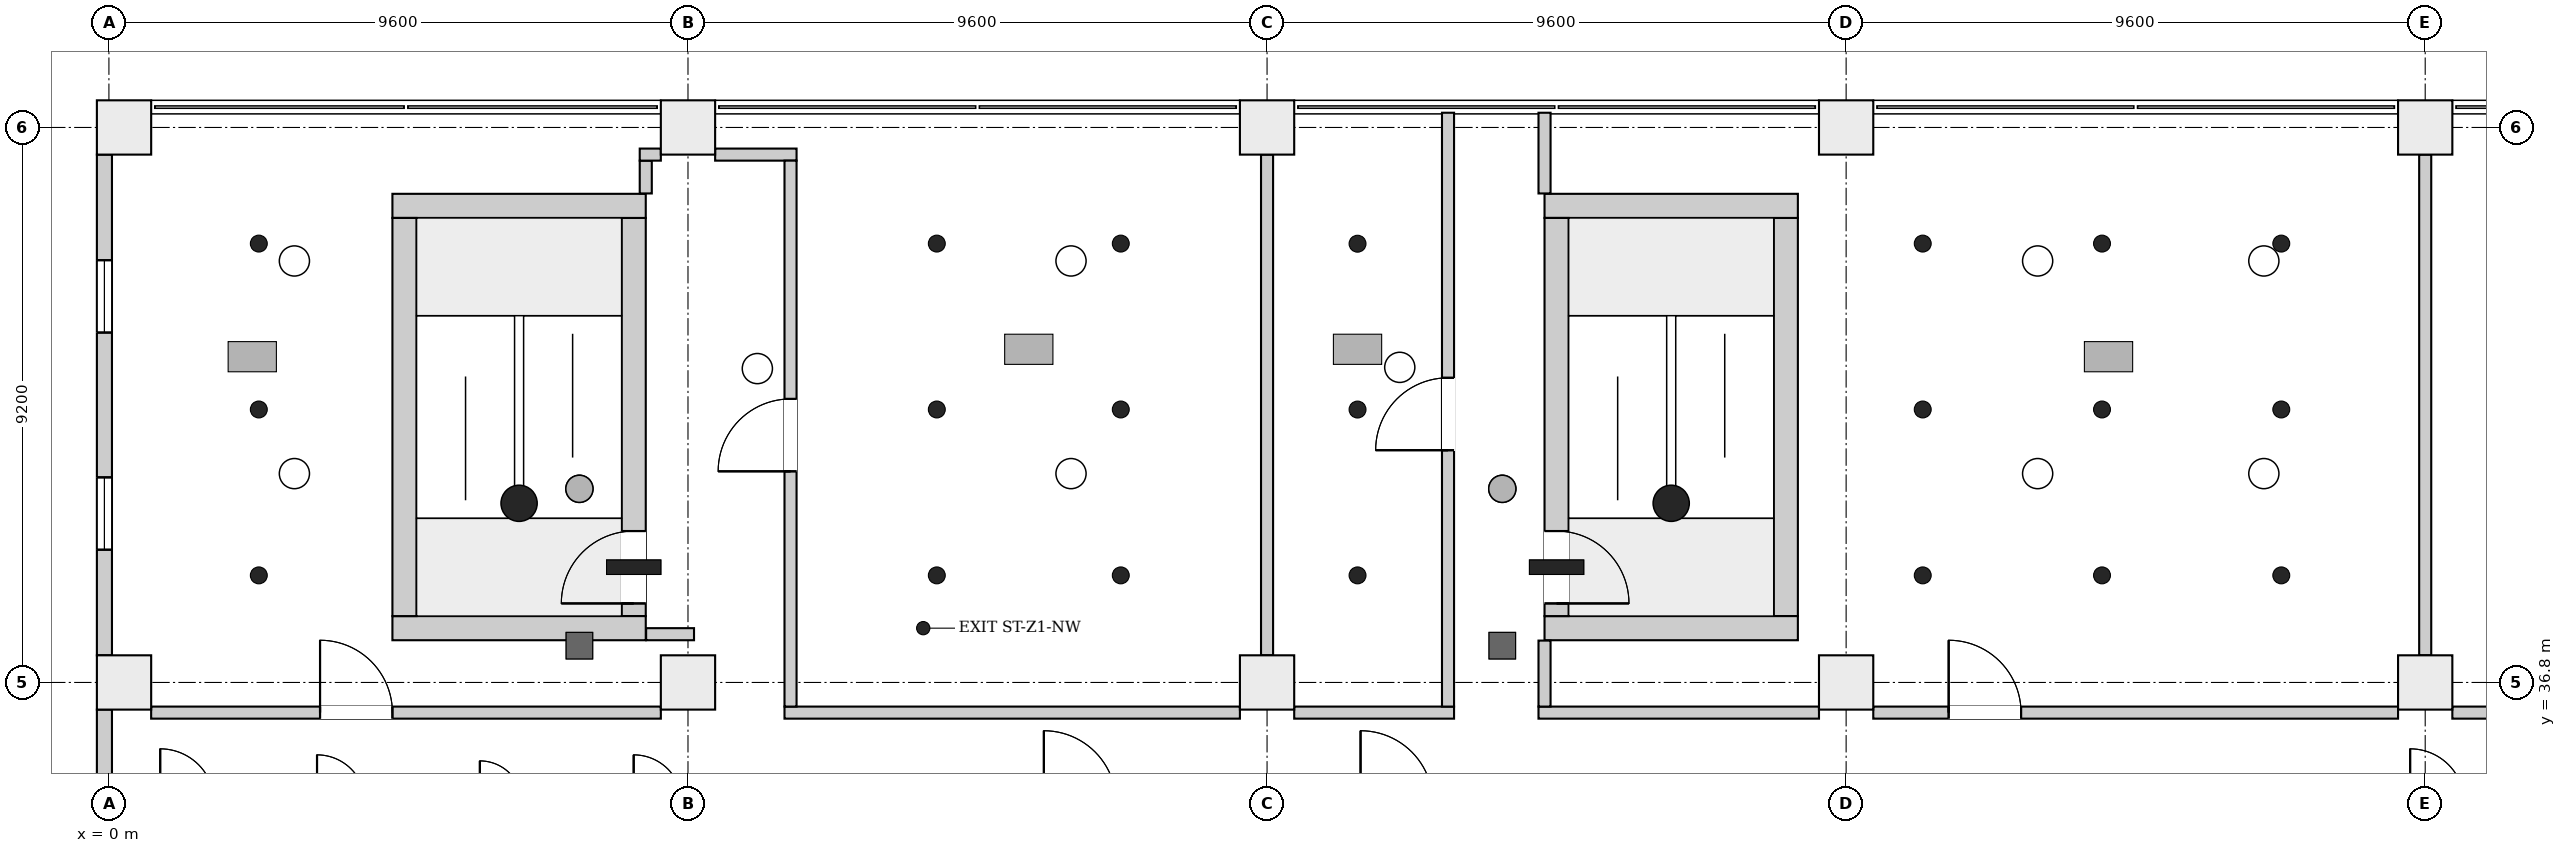
"""IFC4 building model, lengths in metres.
Left out: names, types, materials, properties, quantities, classifications, styles, units other than length and angle.
Written with IfcOpenShell. Run it as: python <this file> out.ifc"""

import sys

from ifc_helpers import new_model, si_unit, direction, frame, frame_2d, origin, origin_2d, place, context, subcontext, project, spatial, rectangle, extrude, element, fill, save


model = new_model("IFC4")
c1 = context("Model", 3, precision=1e-05, world=origin(), true_north=direction((0.0, 1.0)))
c2 = subcontext(c1, "Body", "Model", "MODEL_VIEW")
j1 = project(units=[si_unit("LENGTHUNIT", "METRE"), si_unit("PLANEANGLEUNIT", "RADIAN")], contexts=[c1])
p1 = place(None, origin())
s1 = spatial("IfcSite", under=j1, at=p1, CompositionType="ELEMENT")
p2 = place(p1, origin())
s2 = spatial("IfcBuilding", under=s1, at=p2, CompositionType="ELEMENT")
p3 = place(p2, frame((0.0, 0.0, 36.1)))
s3 = spatial("IfcBuildingStorey", under=s2, at=p3, CompositionType="ELEMENT", Elevation=36.1)
for number, where, z_axis, x_axis in (
    (1, (4.7, 37.7, 0.0), (0.0, 0.0, 1.0), (1.0, 0.0, 0.0)),
    (2, (4.7, 44.7, 0.0), (0.0, 0.0, 1.0), (1.0, 0.0, 0.0)),
):
    element("IfcWall", number, at=place(p3, frame(where, z_axis=z_axis, x_axis=x_axis)), inside=s3, PredefinedType="SHEAR", context=c2, shape_type="SweptSolid", body=[
        extrude(rectangle(XDim=4.2, YDim=0.4, at=frame_2d((2.1, 0.0))), origin(), (0.0, 0.0, 1.0), 4.2),
    ])
p4 = place(p3, frame((4.9, 37.9, 0.0), z_axis=(0.0, 0.0, 1.0), x_axis=(0.0, 1.0, 0.0)))
e3 = element("IfcWall", 3, at=p4, inside=s3, PredefinedType="SHEAR", context=c2, shape_type="SweptSolid", body=[
    extrude(rectangle(XDim=6.6, YDim=0.4, at=frame_2d((3.3, 0.0))), origin(), (0.0, 0.0, 1.0), 4.2),
])
p5 = place(p3, frame((8.7, 37.9, 0.0), z_axis=(0.0, 0.0, 1.0), x_axis=(0.0, 1.0, 0.0)))
e4 = element("IfcWall", 4, at=p5, inside=s3, PredefinedType="SHEAR", context=c2, shape_type="SweptSolid", body=[
    extrude(rectangle(XDim=6.6, YDim=0.4, at=frame_2d((3.3, 0.0))), origin(), (0.0, 0.0, 1.0), 4.2),
])
p6 = place(p5, frame((0.21, 0.0, 0.0)))
e5 = element("IfcOpeningElement", 5, at=p6, cuts=e4, PredefinedType="OPENING", context=c2, shape_type="SweptSolid", body=[
    extrude(rectangle(XDim=1.2, YDim=2.1, at=frame_2d((0.6, 1.05))), frame((0.0, 0.21, 0.0), z_axis=(0.0, -1.0, 0.0), x_axis=(1.0, 0.0, 0.0)), (0.0, 0.0, 1.0), 0.42),
])
for number, where, z_axis, x_axis in (
    (6, (23.8, 37.7, 0.0), (0.0, 0.0, 1.0), (1.0, 0.0, 0.0)),
    (7, (23.8, 44.7, 0.0), (0.0, 0.0, 1.0), (1.0, 0.0, 0.0)),
):
    element("IfcWall", number, at=place(p3, frame(where, z_axis=z_axis, x_axis=x_axis)), inside=s3, PredefinedType="SHEAR", context=c2, shape_type="SweptSolid", body=[
        extrude(rectangle(XDim=4.2, YDim=0.4, at=frame_2d((2.1, 0.0))), origin(), (0.0, 0.0, 1.0), 4.2),
    ])
p7 = place(p3, frame((24.0, 37.9, 0.0), z_axis=(0.0, 0.0, 1.0), x_axis=(0.0, 1.0, 0.0)))
e8 = element("IfcWall", 8, at=p7, inside=s3, PredefinedType="SHEAR", context=c2, shape_type="SweptSolid", body=[
    extrude(rectangle(XDim=6.6, YDim=0.4, at=frame_2d((3.3, 0.0))), origin(), (0.0, 0.0, 1.0), 4.2),
])
p8 = place(p7, frame((0.21, 0.0, 0.0)))
e9 = element("IfcOpeningElement", 9, at=p8, cuts=e8, PredefinedType="OPENING", context=c2, shape_type="SweptSolid", body=[
    extrude(rectangle(XDim=1.2, YDim=2.1, at=frame_2d((0.6, 1.05))), frame((0.0, 0.21, 0.0), z_axis=(0.0, -1.0, 0.0), x_axis=(1.0, 0.0, 0.0)), (0.0, 0.0, 1.0), 0.42),
])
p9 = place(p3, frame((27.8, 37.9, 0.0), z_axis=(0.0, 0.0, 1.0), x_axis=(0.0, 1.0, 0.0)))
e10 = element("IfcWall", 10, at=p9, inside=s3, PredefinedType="SHEAR", context=c2, shape_type="SweptSolid", body=[
    extrude(rectangle(XDim=6.6, YDim=0.4, at=frame_2d((3.3, 0.0))), origin(), (0.0, 0.0, 1.0), 4.2),
])
for number, where, z_axis, x_axis in (
    (11, (0.25, 36.8, 0.0), (0.0, 0.0, 1.0), (1.0, 0.0, 0.0)),
    (12, (9.6, 36.8, 0.0), (0.0, 0.0, 1.0), (1.0, 0.0, 0.0)),
    (13, (19.2, 36.8, 0.0), (0.0, 0.0, 1.0), (1.0, 0.0, 0.0)),
    (14, (28.8, 36.8, 0.0), (0.0, 0.0, 1.0), (1.0, 0.0, 0.0)),
    (15, (38.4, 36.8, 0.0), (0.0, 0.0, 1.0), (1.0, 0.0, 0.0)),
    (16, (0.25, 46.0, 0.0), (0.0, 0.0, 1.0), (1.0, 0.0, 0.0)),
    (17, (9.6, 46.0, 0.0), (0.0, 0.0, 1.0), (1.0, 0.0, 0.0)),
    (18, (19.2, 46.0, 0.0), (0.0, 0.0, 1.0), (1.0, 0.0, 0.0)),
    (19, (28.8, 46.0, 0.0), (0.0, 0.0, 1.0), (1.0, 0.0, 0.0)),
    (20, (38.4, 46.0, 0.0), (0.0, 0.0, 1.0), (1.0, 0.0, 0.0)),
):
    element("IfcColumn", number, at=place(p3, frame(where, z_axis=z_axis, x_axis=x_axis)), inside=s3, PredefinedType="COLUMN", context=c2, shape_type="SweptSolid", body=[
        extrude(rectangle(XDim=0.9, YDim=0.9, at=origin_2d()), origin(), (0.0, 0.0, 1.0), 4.2),
    ])
p10 = place(p3, frame((-0.074, 36.35, 0.0), z_axis=(0.0, 0.0, 1.0), x_axis=(0.0, -1.0, 0.0)))
e21 = element("IfcWall", 21, at=p10, inside=s3, PredefinedType="ELEMENTEDWALL", context=c2, shape_type="SweptSolid", body=[
    extrude(rectangle(XDim=8.3, YDim=0.25, at=frame_2d((4.15, 0.0))), origin(), (0.0, 0.0, 1.0), 3.9),
])
p11 = place(p10, frame((5.35, 0.0, 0.9)))
e22 = element("IfcOpeningElement", 22, at=p11, cuts=e21, PredefinedType="OPENING", context=c2, shape_type="SweptSolid", body=[
    extrude(rectangle(XDim=1.2, YDim=2.6, at=frame_2d((0.6, 1.3))), frame((0.0, 0.135, 0.0), z_axis=(0.0, -1.0, 0.0), x_axis=(1.0, 0.0, 0.0)), (0.0, 0.0, 1.0), 0.27),
])
p12 = place(p10, frame((1.75, 0.0, 0.9)))
e23 = element("IfcOpeningElement", 23, at=p12, cuts=e21, PredefinedType="OPENING", context=c2, shape_type="SweptSolid", body=[
    extrude(rectangle(XDim=1.2, YDim=2.6, at=frame_2d((0.6, 1.3))), frame((0.0, 0.135, 0.0), z_axis=(0.0, -1.0, 0.0), x_axis=(1.0, 0.0, 0.0)), (0.0, 0.0, 1.0), 0.27),
])
p13 = place(p3, frame((-0.074, 45.55, 0.0), z_axis=(0.0, 0.0, 1.0), x_axis=(0.0, -1.0, 0.0)))
e24 = element("IfcWall", 24, at=p13, inside=s3, PredefinedType="ELEMENTEDWALL", context=c2, shape_type="SweptSolid", body=[
    extrude(rectangle(XDim=8.3, YDim=0.25, at=frame_2d((4.15, 0.0))), origin(), (0.0, 0.0, 1.0), 3.9),
])
p14 = place(p13, frame((5.35, 0.0, 0.9)))
e25 = element("IfcOpeningElement", 25, at=p14, cuts=e24, PredefinedType="OPENING", context=c2, shape_type="SweptSolid", body=[
    extrude(rectangle(XDim=1.2, YDim=2.6, at=frame_2d((0.6, 1.3))), frame((0.0, 0.135, 0.0), z_axis=(0.0, -1.0, 0.0), x_axis=(1.0, 0.0, 0.0)), (0.0, 0.0, 1.0), 0.27),
])
p15 = place(p13, frame((1.75, 0.0, 0.9)))
e26 = element("IfcOpeningElement", 26, at=p15, cuts=e24, PredefinedType="OPENING", context=c2, shape_type="SweptSolid", body=[
    extrude(rectangle(XDim=1.2, YDim=2.6, at=frame_2d((0.6, 1.3))), frame((0.0, 0.135, 0.0), z_axis=(0.0, -1.0, 0.0), x_axis=(1.0, 0.0, 0.0)), (0.0, 0.0, 1.0), 0.27),
])
p16 = place(p3, frame((0.7, 36.3, 0.0), z_axis=(0.0, 0.0, 1.0), x_axis=(1.0, 0.0, 0.0)))
e27 = element("IfcWall", 27, at=p16, inside=s3, PredefinedType="PARTITIONING", context=c2, shape_type="SweptSolid", body=[
    extrude(rectangle(XDim=8.45, YDim=0.2, at=frame_2d((4.225, 0.0))), origin(), (0.0, 0.0, 1.0), 3.9),
])
p17 = place(p16, frame((2.8, 0.0, 0.0)))
e28 = element("IfcOpeningElement", 28, at=p17, cuts=e27, PredefinedType="OPENING", context=c2, shape_type="SweptSolid", body=[
    extrude(rectangle(XDim=1.2, YDim=2.1, at=frame_2d((0.6, 1.05))), frame((0.0, 0.11, 0.0), z_axis=(0.0, -1.0, 0.0), x_axis=(1.0, 0.0, 0.0)), (0.0, 0.0, 1.0), 0.22),
])
p18 = place(p3, frame((8.9, 44.906, 0.0), z_axis=(0.0, 0.0, 1.0), x_axis=(0.0, 1.0, 0.0)))
e29 = element("IfcWall", 29, at=p18, inside=s3, PredefinedType="PARTITIONING", context=c2, shape_type="SweptSolid", body=[
    extrude(rectangle(XDim=0.544, YDim=0.2, at=frame_2d((0.272, 0.0))), origin(), (0.0, 0.0, 1.0), 3.9),
])
p19 = place(p3, frame((8.8, 45.55, 0.0), z_axis=(0.0, 0.0, 1.0), x_axis=(1.0, 0.0, 0.0)))
e30 = element("IfcWall", 30, at=p19, inside=s3, PredefinedType="PARTITIONING", context=c2, shape_type="SweptSolid", body=[
    extrude(rectangle(XDim=0.35, YDim=0.2, at=frame_2d((0.175, 0.0))), origin(), (0.0, 0.0, 1.0), 3.9),
])
p20 = place(p3, frame((8.906, 37.6, 0.0), z_axis=(0.0, 0.0, 1.0), x_axis=(1.0, 0.0, 0.0)))
e31 = element("IfcWall", 31, at=p20, inside=s3, PredefinedType="PARTITIONING", context=c2, shape_type="SweptSolid", body=[
    extrude(rectangle(XDim=0.794, YDim=0.2, at=frame_2d((0.397, 0.0))), origin(), (0.0, 0.0, 1.0), 3.9),
])
p21 = place(p3, frame((10.05, 45.55, 0.0), z_axis=(0.0, 0.0, 1.0), x_axis=(1.0, 0.0, 0.0)))
e32 = element("IfcWall", 32, at=p21, inside=s3, PredefinedType="PARTITIONING", context=c2, shape_type="SweptSolid", body=[
    extrude(rectangle(XDim=1.35, YDim=0.2, at=frame_2d((0.675, 0.0))), origin(), (0.0, 0.0, 1.0), 3.9),
])
p22 = place(p3, frame((11.2, 36.3, 0.0), z_axis=(0.0, 0.0, 1.0), x_axis=(1.0, 0.0, 0.0)))
e33 = element("IfcWall", 33, at=p22, inside=s3, PredefinedType="PARTITIONING", context=c2, shape_type="SweptSolid", body=[
    extrude(rectangle(XDim=7.55, YDim=0.2, at=frame_2d((3.775, 0.0))), origin(), (0.0, 0.0, 1.0), 3.9),
])
p23 = place(p3, frame((11.3, 36.4, 0.0), z_axis=(0.0, 0.0, 1.0), x_axis=(0.0, 1.0, 0.0)))
e34 = element("IfcWall", 34, at=p23, inside=s3, PredefinedType="PARTITIONING", context=c2, shape_type="SweptSolid", body=[
    extrude(rectangle(XDim=9.05, YDim=0.2, at=frame_2d((4.525, 0.0))), origin(), (0.0, 0.0, 1.0), 3.9),
])
p24 = place(p23, frame((3.9, 0.0, 0.0)))
e35 = element("IfcOpeningElement", 35, at=p24, cuts=e34, PredefinedType="OPENING", context=c2, shape_type="SweptSolid", body=[
    extrude(rectangle(XDim=1.2, YDim=2.1, at=frame_2d((0.6, 1.05))), frame((0.0, 0.11, 0.0), z_axis=(0.0, -1.0, 0.0), x_axis=(1.0, 0.0, 0.0)), (0.0, 0.0, 1.0), 0.22),
])
p25 = place(p3, frame((19.2, 37.25, 0.0), z_axis=(0.0, 0.0, 1.0), x_axis=(0.0, 1.0, 0.0)))
e36 = element("IfcWall", 36, at=p25, inside=s3, PredefinedType="PARTITIONING", context=c2, shape_type="SweptSolid", body=[
    extrude(rectangle(XDim=8.3, YDim=0.2, at=frame_2d((4.15, 0.0))), origin(), (0.0, 0.0, 1.0), 3.9),
])
p26 = place(p3, frame((19.65, 36.3, 0.0), z_axis=(0.0, 0.0, 1.0), x_axis=(1.0, 0.0, 0.0)))
e37 = element("IfcWall", 37, at=p26, inside=s3, PredefinedType="PARTITIONING", context=c2, shape_type="SweptSolid", body=[
    extrude(rectangle(XDim=2.65, YDim=0.2, at=frame_2d((1.325, 0.0))), origin(), (0.0, 0.0, 1.0), 3.9),
])
p27 = place(p3, frame((22.2, 36.4, 0.0), z_axis=(0.0, 0.0, 1.0), x_axis=(0.0, 1.0, 0.0)))
e38 = element("IfcWall", 38, at=p27, inside=s3, PredefinedType="PARTITIONING", context=c2, shape_type="SweptSolid", body=[
    extrude(rectangle(XDim=9.844, YDim=0.2, at=frame_2d((4.922, 0.0))), origin(), (0.0, 0.0, 1.0), 3.9),
])
p28 = place(p27, frame((4.25, 0.0, 0.0)))
e39 = element("IfcOpeningElement", 39, at=p28, cuts=e38, PredefinedType="OPENING", context=c2, shape_type="SweptSolid", body=[
    extrude(rectangle(XDim=1.2, YDim=2.1, at=frame_2d((0.6, 1.05))), frame((0.0, 0.11, 0.0), z_axis=(0.0, -1.0, 0.0), x_axis=(1.0, 0.0, 0.0)), (0.0, 0.0, 1.0), 0.22),
])
p29 = place(p3, frame((23.7, 36.3, 0.0), z_axis=(0.0, 0.0, 1.0), x_axis=(1.0, 0.0, 0.0)))
e40 = element("IfcWall", 40, at=p29, inside=s3, PredefinedType="PARTITIONING", context=c2, shape_type="SweptSolid", body=[
    extrude(rectangle(XDim=4.65, YDim=0.2, at=frame_2d((2.325, 0.0))), origin(), (0.0, 0.0, 1.0), 3.9),
])
p30 = place(p3, frame((23.8, 36.4, 0.0), z_axis=(0.0, 0.0, 1.0), x_axis=(0.0, 1.0, 0.0)))
e41 = element("IfcWall", 41, at=p30, inside=s3, PredefinedType="PARTITIONING", context=c2, shape_type="SweptSolid", body=[
    extrude(rectangle(XDim=1.094, YDim=0.2, at=frame_2d((0.547, 0.0))), origin(), (0.0, 0.0, 1.0), 3.9),
])
p31 = place(p3, frame((23.8, 44.906, 0.0), z_axis=(0.0, 0.0, 1.0), x_axis=(0.0, 1.0, 0.0)))
e42 = element("IfcWall", 42, at=p31, inside=s3, PredefinedType="PARTITIONING", context=c2, shape_type="SweptSolid", body=[
    extrude(rectangle(XDim=1.338, YDim=0.2, at=frame_2d((0.669, 0.0))), origin(), (0.0, 0.0, 1.0), 3.9),
])
p32 = place(p3, frame((29.25, 36.3, 0.0), z_axis=(0.0, 0.0, 1.0), x_axis=(1.0, 0.0, 0.0)))
e43 = element("IfcWall", 43, at=p32, inside=s3, PredefinedType="PARTITIONING", context=c2, shape_type="SweptSolid", body=[
    extrude(rectangle(XDim=8.7, YDim=0.2, at=frame_2d((4.35, 0.0))), origin(), (0.0, 0.0, 1.0), 3.9),
])
p33 = place(p32, frame((1.25, 0.0, 0.0)))
e44 = element("IfcOpeningElement", 44, at=p33, cuts=e43, PredefinedType="OPENING", context=c2, shape_type="SweptSolid", body=[
    extrude(rectangle(XDim=1.2, YDim=2.1, at=frame_2d((0.6, 1.05))), frame((0.0, 0.11, 0.0), z_axis=(0.0, -1.0, 0.0), x_axis=(1.0, 0.0, 0.0)), (0.0, 0.0, 1.0), 0.22),
])
p34 = place(p3, frame((38.4, 37.25, 0.0), z_axis=(0.0, 0.0, 1.0), x_axis=(0.0, 1.0, 0.0)))
e45 = element("IfcWall", 45, at=p34, inside=s3, PredefinedType="PARTITIONING", context=c2, shape_type="SweptSolid", body=[
    extrude(rectangle(XDim=8.3, YDim=0.2, at=frame_2d((4.15, 0.0))), origin(), (0.0, 0.0, 1.0), 3.9),
])
p35 = place(p3, frame((38.85, 36.3, 0.0), z_axis=(0.0, 0.0, 1.0), x_axis=(1.0, 0.0, 0.0)))
e46 = element("IfcWall", 46, at=p35, inside=s3, PredefinedType="PARTITIONING", context=c2, shape_type="SweptSolid", body=[
    extrude(rectangle(XDim=8.7, YDim=0.2, at=frame_2d((4.35, 0.0))), origin(), (0.0, 0.0, 1.0), 3.9),
])
p36 = place(p35, frame((3.85, 0.0, 0.0)))
e47 = element("IfcOpeningElement", 47, at=p36, cuts=e46, PredefinedType="OPENING", context=c2, shape_type="SweptSolid", body=[
    extrude(rectangle(XDim=1.2, YDim=2.1, at=frame_2d((0.6, 1.05))), frame((0.0, 0.11, 0.0), z_axis=(0.0, -1.0, 0.0), x_axis=(1.0, 0.0, 0.0)), (0.0, 0.0, 1.0), 0.22),
])
p37 = place(p14, origin())
e48 = element("IfcWindow", 48, at=p37, inside=s3, PartitioningType="SINGLE_PANEL", PredefinedType="WINDOW", context=c2, shape_type="SweptSolid", body=[
    extrude(rectangle(XDim=1.2, YDim=2.6, at=frame_2d((0.6, 1.3))), frame((0.0, 0.03, 0.0), z_axis=(0.0, -1.0, 0.0), x_axis=(1.0, 0.0, 0.0)), (0.0, 0.0, 1.0), 0.06),
])
fill(e25, e48)
p38 = place(p15, origin())
e49 = element("IfcWindow", 49, at=p38, inside=s3, PartitioningType="SINGLE_PANEL", PredefinedType="WINDOW", context=c2, shape_type="SweptSolid", body=[
    extrude(rectangle(XDim=1.2, YDim=2.6, at=frame_2d((0.6, 1.3))), frame((0.0, 0.03, 0.0), z_axis=(0.0, -1.0, 0.0), x_axis=(1.0, 0.0, 0.0)), (0.0, 0.0, 1.0), 0.06),
])
fill(e26, e49)
p39 = place(p6, origin())
e50 = element("IfcDoor", 50, at=p39, inside=s3, OperationType="SINGLE_SWING_RIGHT", PredefinedType="DOOR", context=c2, shape_type="SweptSolid", body=[
    extrude(rectangle(XDim=1.2, YDim=2.1, at=frame_2d((0.6, 1.05))), frame((0.0, 0.025, 0.0), z_axis=(0.0, -1.0, 0.0), x_axis=(1.0, 0.0, 0.0)), (0.0, 0.0, 1.0), 0.05),
])
fill(e5, e50)
p40 = place(p8, origin())
e51 = element("IfcDoor", 51, at=p40, inside=s3, OperationType="SINGLE_SWING_LEFT", PredefinedType="DOOR", context=c2, shape_type="SweptSolid", body=[
    extrude(rectangle(XDim=1.2, YDim=2.1, at=frame_2d((0.6, 1.05))), frame((0.0, 0.025, 0.0), z_axis=(0.0, -1.0, 0.0), x_axis=(1.0, 0.0, 0.0)), (0.0, 0.0, 1.0), 0.05),
])
fill(e9, e51)
p41 = place(p17, origin())
e52 = element("IfcDoor", 52, at=p41, inside=s3, OperationType="SINGLE_SWING_RIGHT", PredefinedType="DOOR", context=c2, shape_type="SweptSolid", body=[
    extrude(rectangle(XDim=1.2, YDim=2.1, at=frame_2d((0.6, 1.05))), frame((0.0, 0.025, 0.0), z_axis=(0.0, -1.0, 0.0), x_axis=(1.0, 0.0, 0.0)), (0.0, 0.0, 1.0), 0.05),
])
fill(e28, e52)
p42 = place(p24, origin())
e53 = element("IfcDoor", 53, at=p42, inside=s3, OperationType="SINGLE_SWING_LEFT", PredefinedType="DOOR", context=c2, shape_type="SweptSolid", body=[
    extrude(rectangle(XDim=1.2, YDim=2.1, at=frame_2d((0.6, 1.05))), frame((0.0, 0.025, 0.0), z_axis=(0.0, -1.0, 0.0), x_axis=(1.0, 0.0, 0.0)), (0.0, 0.0, 1.0), 0.05),
])
fill(e35, e53)
p43 = place(p28, origin())
e54 = element("IfcDoor", 54, at=p43, inside=s3, OperationType="SINGLE_SWING_RIGHT", PredefinedType="DOOR", context=c2, shape_type="SweptSolid", body=[
    extrude(rectangle(XDim=1.2, YDim=2.1, at=frame_2d((0.6, 1.05))), frame((0.0, 0.025, 0.0), z_axis=(0.0, -1.0, 0.0), x_axis=(1.0, 0.0, 0.0)), (0.0, 0.0, 1.0), 0.05),
])
fill(e39, e54)
p44 = place(p33, origin())
e55 = element("IfcDoor", 55, at=p44, inside=s3, OperationType="SINGLE_SWING_LEFT", PredefinedType="DOOR", context=c2, shape_type="SweptSolid", body=[
    extrude(rectangle(XDim=1.2, YDim=2.1, at=frame_2d((0.6, 1.05))), frame((0.0, 0.025, 0.0), z_axis=(0.0, -1.0, 0.0), x_axis=(1.0, 0.0, 0.0)), (0.0, 0.0, 1.0), 0.05),
])
fill(e44, e55)
save(model, sys.argv[1])
